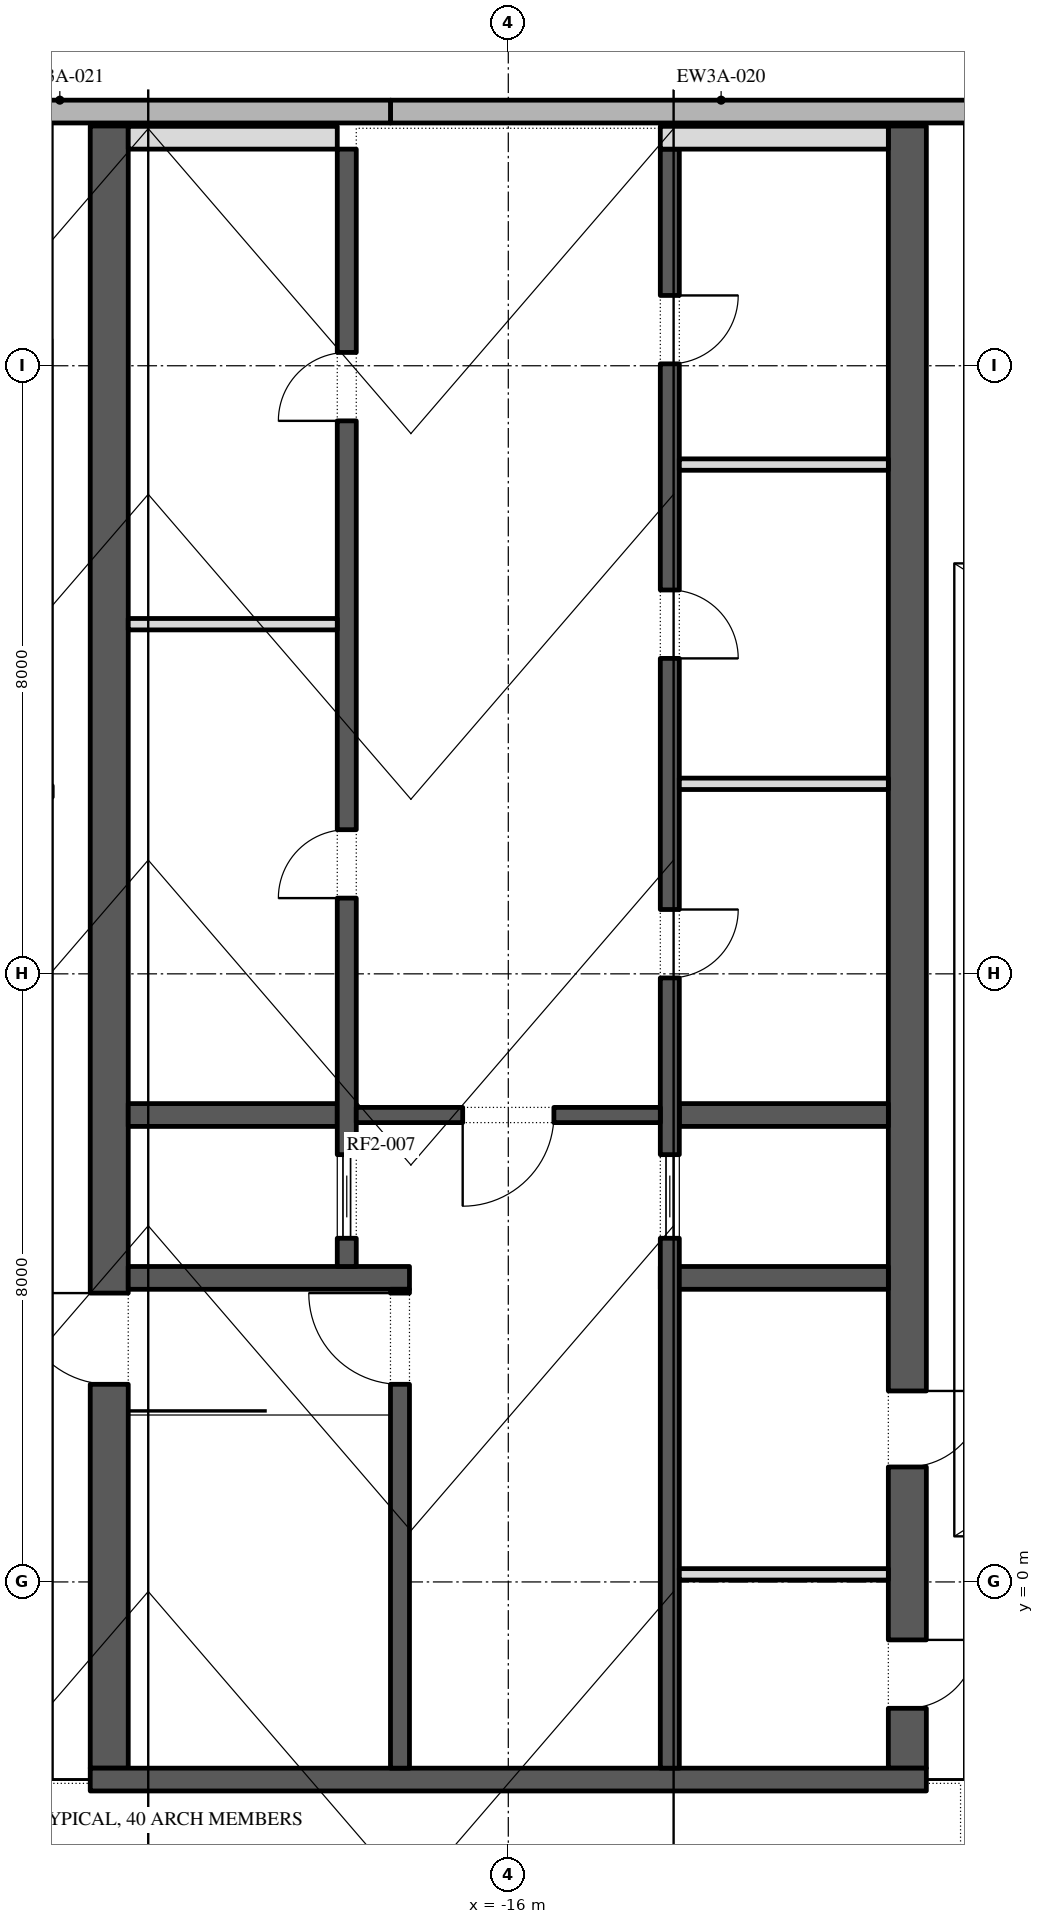
"""IFC4 building model, lengths in metres.
Left out: names, types, materials, properties, quantities, classifications, styles, units other than length and angle.
Written with IfcOpenShell. Run it as: python <this file> out.ifc"""

import sys

from ifc_helpers import new_model, si_unit, direction, frame, frame_2d, origin, place, context, subcontext, project, spatial, polyline, rectangle, outline, extrude, element, fill, save


model = new_model("IFC4")
c1 = context("Model", 3, precision=1e-05, world=origin(), true_north=direction((0.0, 1.0)))
c2 = subcontext(c1, "Body", "Model", "MODEL_VIEW")
j1 = project(units=[si_unit("LENGTHUNIT", "METRE"), si_unit("PLANEANGLEUNIT", "RADIAN")], contexts=[c1])
p1 = place(None, origin())
s1 = spatial("IfcSite", under=j1, at=p1, CompositionType="ELEMENT")
p2 = place(p1, origin())
s2 = spatial("IfcBuilding", under=s1, at=p2, CompositionType="ELEMENT")
p3 = place(p2, frame((0.0, 0.0, 394.2)))
s3 = spatial("IfcBuildingStorey", under=s2, at=p3, CompositionType="ELEMENT", Elevation=394.2)
for number, where, z_axis, x_axis in (
    (1, (-8.85, 19.344, 0.0), (0.0, 0.0, 1.0), (-1.0, 0.0, 0.0)),
    (2, (-17.55, 19.344, 0.0), (0.0, 0.0, 1.0), (-1.0, 0.0, 0.0)),
):
    element("IfcWall", number, at=place(p3, frame(where, z_axis=z_axis, x_axis=x_axis)), inside=s3, PredefinedType="STANDARD", context=c2, shape_type="SweptSolid", body=[
        extrude(rectangle(XDim=8.7, YDim=0.3, at=frame_2d((4.35, 0.0))), origin(), (0.0, 0.0, 1.0), 2.2),
    ])
p4 = place(p3, frame((-21.25, -2.45, 0.0), z_axis=(0.0, 0.0, 1.0), x_axis=(0.0, 1.0, 0.0)))
e3 = element("IfcWall", 3, at=p4, inside=s3, PredefinedType="SHEAR", context=c2, shape_type="SweptSolid", body=[
    extrude(outline(polyline([(0.0, 0.0), (21.604, 0.0), (21.604, 0.754), (16.939, 3.9), (0.0, 3.9), (0.0, 0.0)])), frame((0.0, 0.25, 0.0), z_axis=(0.0, -1.0, 0.0), x_axis=(1.0, 0.0, 0.0)), (0.0, 0.0, 1.0), 0.5),
])
p5 = place(p4, frame((5.05, 0.0, 0.0)))
e4 = element("IfcOpeningElement", 4, at=p5, cuts=e3, PredefinedType="OPENING", context=c2, shape_type="SweptSolid", body=[
    extrude(rectangle(XDim=1.2, YDim=2.1, at=frame_2d((0.6, 1.05))), frame((0.0, 0.26, 0.0), z_axis=(0.0, -1.0, 0.0), x_axis=(1.0, 0.0, 0.0)), (0.0, 0.0, 1.0), 0.52),
])
p6 = place(p3, frame((-10.75, -2.45, 0.0), z_axis=(0.0, 0.0, 1.0), x_axis=(0.0, 1.0, 0.0)))
e5 = element("IfcWall", 5, at=p6, inside=s3, PredefinedType="SHEAR", context=c2, shape_type="SweptSolid", body=[
    extrude(outline(polyline([(0.0, 0.0), (21.604, 0.0), (21.604, 0.754), (16.939, 3.9), (0.0, 3.9), (0.0, 0.0)])), frame((0.0, 0.25, 0.0), z_axis=(0.0, -1.0, 0.0), x_axis=(1.0, 0.0, 0.0)), (0.0, 0.0, 1.0), 0.5),
])
p7 = place(p6, frame((0.788, 0.0, 0.0)))
e6 = element("IfcOpeningElement", 6, at=p7, cuts=e5, PredefinedType="OPENING", context=c2, shape_type="SweptSolid", body=[
    extrude(rectangle(XDim=0.9, YDim=2.1, at=frame_2d((0.45, 1.05))), frame((0.0, 0.26, 0.0), z_axis=(0.0, -1.0, 0.0), x_axis=(1.0, 0.0, 0.0)), (0.0, 0.0, 1.0), 0.52),
])
p8 = place(p6, frame((3.962, 0.0, 0.0)))
e7 = element("IfcOpeningElement", 7, at=p8, cuts=e5, PredefinedType="OPENING", context=c2, shape_type="SweptSolid", body=[
    extrude(rectangle(XDim=1.0, YDim=2.1, at=frame_2d((0.5, 1.05))), frame((0.0, 0.26, 0.0), z_axis=(0.0, -1.0, 0.0), x_axis=(1.0, 0.0, 0.0)), (0.0, 0.0, 1.0), 0.52),
])
p9 = place(p3, frame((-21.5, -2.6, 0.0), z_axis=(0.0, 0.0, 1.0), x_axis=(1.0, 0.0, 0.0)))
e8 = element("IfcWall", 8, at=p9, inside=s3, PredefinedType="SHEAR", context=c2, shape_type="SweptSolid", body=[
    extrude(rectangle(XDim=11.0, YDim=0.3, at=frame_2d((5.5, 0.0))), origin(), (0.0, 0.0, 1.0), 3.9),
])
p10 = place(p3, frame((-21.0, 4.0, 0.0), z_axis=(0.0, 0.0, 1.0), x_axis=(1.0, 0.0, 0.0)))
e9 = element("IfcWall", 9, at=p10, inside=s3, PredefinedType="SHEAR", context=c2, shape_type="SweptSolid", body=[
    extrude(rectangle(XDim=3.7, YDim=0.3, at=frame_2d((1.85, 0.0))), origin(), (0.0, 0.0, 1.0), 3.9),
])
p11 = place(p3, frame((-17.425, -2.45, 0.0), z_axis=(0.0, 0.0, 1.0), x_axis=(0.0, 1.0, 0.0)))
e10 = element("IfcWall", 10, at=p11, inside=s3, PredefinedType="SHEAR", context=c2, shape_type="SweptSolid", body=[
    extrude(rectangle(XDim=6.3, YDim=0.25, at=frame_2d((3.15, 0.0))), origin(), (0.0, 0.0, 1.0), 3.9),
])
p12 = place(p11, frame((5.05, 0.0, 0.0)))
e11 = element("IfcOpeningElement", 11, at=p12, cuts=e10, PredefinedType="OPENING", context=c2, shape_type="SweptSolid", body=[
    extrude(rectangle(XDim=1.2, YDim=2.1, at=frame_2d((0.6, 1.05))), frame((0.0, 0.135, 0.0), z_axis=(0.0, -1.0, 0.0), x_axis=(1.0, 0.0, 0.0)), (0.0, 0.0, 1.0), 0.27),
])
p13 = place(p3, frame((-21.0, 6.143, 0.0), z_axis=(0.0, 0.0, 1.0), x_axis=(1.0, 0.0, 0.0)))
e12 = element("IfcWall", 12, at=p13, inside=s3, PredefinedType="SHEAR", context=c2, shape_type="SweptSolid", body=[
    extrude(rectangle(XDim=2.75, YDim=0.3, at=frame_2d((1.375, 0.0))), origin(), (0.0, 0.0, 1.0), 3.9),
])
p14 = place(p3, frame((-18.125, 4.15, 0.0), z_axis=(0.0, 0.0, 1.0), x_axis=(0.0, 1.0, 0.0)))
e13 = element("IfcWall", 13, at=p14, inside=s3, PredefinedType="SHEAR", context=c2, shape_type="SweptSolid", body=[
    extrude(outline(polyline([(0.0, 0.0), (14.7, 0.0), (14.7, 0.959), (10.339, 3.9), (0.0, 3.9), (0.0, 0.0)])), frame((0.0, 0.125, 0.0), z_axis=(0.0, -1.0, 0.0), x_axis=(1.0, 0.0, 0.0)), (0.0, 0.0, 1.0), 0.25),
])
p15 = place(p14, frame((4.846, 0.0, 0.0)))
e14 = element("IfcOpeningElement", 14, at=p15, cuts=e13, PredefinedType="OPENING", context=c2, shape_type="SweptSolid", body=[
    extrude(rectangle(XDim=0.9, YDim=2.1, at=frame_2d((0.45, 1.05))), frame((0.0, 0.135, 0.0), z_axis=(0.0, -1.0, 0.0), x_axis=(1.0, 0.0, 0.0)), (0.0, 0.0, 1.0), 0.27),
])
p16 = place(p14, frame((11.125, 0.0, 0.0)))
e15 = element("IfcOpeningElement", 15, at=p16, cuts=e13, PredefinedType="OPENING", context=c2, shape_type="SweptSolid", body=[
    extrude(rectangle(XDim=0.9, YDim=2.1, at=frame_2d((0.45, 1.05))), frame((0.0, 0.135, 0.0), z_axis=(0.0, -1.0, 0.0), x_axis=(1.0, 0.0, 0.0)), (0.0, 0.0, 1.0), 0.27),
])
p17 = place(p14, frame((0.371, 0.0, 0.0)))
e16 = element("IfcOpeningElement", 16, at=p17, cuts=e13, PredefinedType="OPENING", context=c2, shape_type="SweptSolid", body=[
    extrude(rectangle(XDim=1.1, YDim=2.1, at=frame_2d((0.55, 1.05))), frame((0.0, 0.135, 0.0), z_axis=(0.0, -1.0, 0.0), x_axis=(1.0, 0.0, 0.0)), (0.0, 0.0, 1.0), 0.27),
])
p18 = place(p3, frame((-21.0, 19.0, 0.0), z_axis=(0.0, 0.0, 1.0), x_axis=(1.0, 0.0, 0.0)))
e17 = element("IfcWall", 17, at=p18, inside=s3, PredefinedType="PARTITIONING", context=c2, shape_type="SweptSolid", body=[
    extrude(outline(polyline([(0.0, 0.0), (2.75, 0.0), (2.75, 0.858), (0.0, 0.858), (0.0, 0.0)])), frame((0.0, 0.15, 0.0), z_axis=(0.0, -1.0, 0.0), x_axis=(1.0, 0.0, 0.0)), (0.0, 0.0, 1.0), 0.3),
])
p19 = place(p3, frame((-21.0, 12.6, 0.0), z_axis=(0.0, 0.0, 1.0), x_axis=(1.0, 0.0, 0.0)))
e18 = element("IfcWall", 18, at=p19, inside=s3, PredefinedType="PARTITIONING", context=c2, shape_type="SweptSolid", body=[
    extrude(rectangle(XDim=2.75, YDim=0.15, at=frame_2d((1.375, 0.0))), origin(), (0.0, 0.0, 1.0), 3.9),
])
p20 = place(p3, frame((-14.0, 4.0, 0.0), z_axis=(0.0, 0.0, 1.0), x_axis=(1.0, 0.0, 0.0)))
e19 = element("IfcWall", 19, at=p20, inside=s3, PredefinedType="SHEAR", context=c2, shape_type="SweptSolid", body=[
    extrude(rectangle(XDim=3.0, YDim=0.3, at=frame_2d((1.5, 0.0))), origin(), (0.0, 0.0, 1.0), 3.9),
])
p21 = place(p3, frame((-13.75, 6.143, 0.0), z_axis=(0.0, 0.0, 1.0), x_axis=(1.0, 0.0, 0.0)))
e20 = element("IfcWall", 20, at=p21, inside=s3, PredefinedType="SHEAR", context=c2, shape_type="SweptSolid", body=[
    extrude(rectangle(XDim=2.75, YDim=0.3, at=frame_2d((1.375, 0.0))), origin(), (0.0, 0.0, 1.0), 3.9),
])
p22 = place(p3, frame((-13.875, -2.45, 0.0), z_axis=(0.0, 0.0, 1.0), x_axis=(0.0, 1.0, 0.0)))
e21 = element("IfcWall", 21, at=p22, inside=s3, PredefinedType="SHEAR", context=c2, shape_type="SweptSolid", body=[
    extrude(outline(polyline([(0.0, 0.0), (21.3, 0.0), (21.3, 0.959), (16.939, 3.9), (0.0, 3.9), (0.0, 0.0)])), frame((0.0, 0.125, 0.0), z_axis=(0.0, -1.0, 0.0), x_axis=(1.0, 0.0, 0.0)), (0.0, 0.0, 1.0), 0.25),
])
p23 = place(p22, frame((10.396, 0.0, 0.0)))
e22 = element("IfcOpeningElement", 22, at=p23, cuts=e21, PredefinedType="OPENING", context=c2, shape_type="SweptSolid", body=[
    extrude(rectangle(XDim=0.9, YDim=2.1, at=frame_2d((0.45, 1.05))), frame((0.0, 0.135, 0.0), z_axis=(0.0, -1.0, 0.0), x_axis=(1.0, 0.0, 0.0)), (0.0, 0.0, 1.0), 0.27),
])
p24 = place(p22, frame((14.6, 0.0, 0.0)))
e23 = element("IfcOpeningElement", 23, at=p24, cuts=e21, PredefinedType="OPENING", context=c2, shape_type="SweptSolid", body=[
    extrude(rectangle(XDim=0.9, YDim=2.1, at=frame_2d((0.45, 1.05))), frame((0.0, 0.135, 0.0), z_axis=(0.0, -1.0, 0.0), x_axis=(1.0, 0.0, 0.0)), (0.0, 0.0, 1.0), 0.27),
])
p25 = place(p22, frame((18.475, 0.0, 0.0)))
e24 = element("IfcOpeningElement", 24, at=p25, cuts=e21, PredefinedType="OPENING", context=c2, shape_type="SweptSolid", body=[
    extrude(rectangle(XDim=0.9, YDim=2.1, at=frame_2d((0.45, 1.05))), frame((0.0, 0.135, 0.0), z_axis=(0.0, -1.0, 0.0), x_axis=(1.0, 0.0, 0.0)), (0.0, 0.0, 1.0), 0.27),
])
p26 = place(p22, frame((6.971, 0.0, 0.0)))
e25 = element("IfcOpeningElement", 25, at=p26, cuts=e21, PredefinedType="OPENING", context=c2, shape_type="SweptSolid", body=[
    extrude(rectangle(XDim=1.1, YDim=2.1, at=frame_2d((0.55, 1.05))), frame((0.0, 0.135, 0.0), z_axis=(0.0, -1.0, 0.0), x_axis=(1.0, 0.0, 0.0)), (0.0, 0.0, 1.0), 0.27),
])
p27 = place(p3, frame((-14.0, 19.0, 0.0), z_axis=(0.0, 0.0, 1.0), x_axis=(1.0, 0.0, 0.0)))
e26 = element("IfcWall", 26, at=p27, inside=s3, PredefinedType="PARTITIONING", context=c2, shape_type="SweptSolid", body=[
    extrude(outline(polyline([(0.0, 0.0), (3.0, 0.0), (3.0, 0.858), (0.0, 0.858), (0.0, 0.0)])), frame((0.0, 0.15, 0.0), z_axis=(0.0, -1.0, 0.0), x_axis=(1.0, 0.0, 0.0)), (0.0, 0.0, 1.0), 0.3),
])
p28 = place(p3, frame((-13.75, 10.5, 0.0), z_axis=(0.0, 0.0, 1.0), x_axis=(1.0, 0.0, 0.0)))
e27 = element("IfcWall", 27, at=p28, inside=s3, PredefinedType="PARTITIONING", context=c2, shape_type="SweptSolid", body=[
    extrude(rectangle(XDim=2.75, YDim=0.15, at=frame_2d((1.375, 0.0))), origin(), (0.0, 0.0, 1.0), 3.9),
])
p29 = place(p3, frame((-13.75, 14.7, 0.0), z_axis=(0.0, 0.0, 1.0), x_axis=(1.0, 0.0, 0.0)))
e28 = element("IfcWall", 28, at=p29, inside=s3, PredefinedType="PARTITIONING", context=c2, shape_type="SweptSolid", body=[
    extrude(outline(polyline([(0.0, 0.0), (2.75, 0.0), (2.75, 3.758), (0.0, 3.758), (0.0, 0.0)])), frame((0.0, 0.075, 0.0), z_axis=(0.0, -1.0, 0.0), x_axis=(1.0, 0.0, 0.0)), (0.0, 0.0, 1.0), 0.15),
])
p30 = place(p3, frame((-18.0, 6.143, 0.0), z_axis=(0.0, 0.0, 1.0), x_axis=(1.0, 0.0, 0.0)))
e29 = element("IfcWall", 29, at=p30, inside=s3, PredefinedType="SHEAR", context=c2, shape_type="SweptSolid", body=[
    extrude(rectangle(XDim=4.0, YDim=0.2, at=frame_2d((2.0, 0.0))), origin(), (0.0, 0.0, 1.0), 3.9),
])
p31 = place(p30, frame((1.4, 0.0, 0.0)))
e30 = element("IfcOpeningElement", 30, at=p31, cuts=e29, PredefinedType="OPENING", context=c2, shape_type="SweptSolid", body=[
    extrude(rectangle(XDim=1.2, YDim=2.1, at=frame_2d((0.6, 1.05))), frame((0.0, 0.11, 0.0), z_axis=(0.0, -1.0, 0.0), x_axis=(1.0, 0.0, 0.0)), (0.0, 0.0, 1.0), 0.22),
])
p32 = place(p3, frame((-13.75, 0.1, 0.0), z_axis=(0.0, 0.0, 1.0), x_axis=(1.0, 0.0, 0.0)))
e31 = element("IfcWall", 31, at=p32, inside=s3, PredefinedType="PARTITIONING", context=c2, shape_type="SweptSolid", body=[
    extrude(rectangle(XDim=2.75, YDim=0.15, at=frame_2d((1.375, 0.0))), origin(), (0.0, 0.0, 1.0), 3.9),
])
p33 = place(p15, origin())
e32 = element("IfcDoor", 32, at=p33, inside=s3, OperationType="SINGLE_SWING_RIGHT", PredefinedType="DOOR", context=c2, shape_type="SweptSolid", body=[
    extrude(rectangle(XDim=0.9, YDim=2.1, at=frame_2d((0.45, 1.05))), frame((0.0, 0.125, 0.0), z_axis=(0.0, -1.0, 0.0), x_axis=(1.0, 0.0, 0.0)), (0.0, 0.0, 1.0), 0.05),
])
fill(e14, e32)
p34 = place(p16, origin())
e33 = element("IfcDoor", 33, at=p34, inside=s3, OperationType="SINGLE_SWING_RIGHT", PredefinedType="DOOR", context=c2, shape_type="SweptSolid", body=[
    extrude(rectangle(XDim=0.9, YDim=2.1, at=frame_2d((0.45, 1.05))), frame((0.0, 0.125, 0.0), z_axis=(0.0, -1.0, 0.0), x_axis=(1.0, 0.0, 0.0)), (0.0, 0.0, 1.0), 0.05),
])
fill(e15, e33)
p35 = place(p17, origin())
e34 = element("IfcDoor", 34, at=p35, inside=s3, OperationType="SLIDING_TO_LEFT", PredefinedType="DOOR", context=c2, shape_type="SweptSolid", body=[
    extrude(rectangle(XDim=1.1, YDim=2.1, at=frame_2d((0.55, 1.05))), frame((0.0, 0.025, 0.0), z_axis=(0.0, -1.0, 0.0), x_axis=(1.0, 0.0, 0.0)), (0.0, 0.0, 1.0), 0.05),
])
fill(e16, e34)
p36 = place(p23, frame((0.9, -0.2, 0.0), z_axis=(0.0, 0.0, 1.0), x_axis=(-1.0, 0.0, 0.0)))
e35 = element("IfcDoor", 35, at=p36, inside=s3, OperationType="SINGLE_SWING_RIGHT", PredefinedType="DOOR", context=c2, shape_type="SweptSolid", body=[
    extrude(rectangle(XDim=0.9, YDim=2.1, at=frame_2d((0.45, 1.05))), frame((0.0, -0.075, 0.0), z_axis=(0.0, -1.0, 0.0), x_axis=(1.0, 0.0, 0.0)), (0.0, 0.0, 1.0), 0.05),
])
fill(e22, e35)
p37 = place(p24, frame((0.9, -0.2, 0.0), z_axis=(0.0, 0.0, 1.0), x_axis=(-1.0, 0.0, 0.0)))
e36 = element("IfcDoor", 36, at=p37, inside=s3, OperationType="SINGLE_SWING_LEFT", PredefinedType="DOOR", context=c2, shape_type="SweptSolid", body=[
    extrude(rectangle(XDim=0.9, YDim=2.1, at=frame_2d((0.45, 1.05))), frame((0.0, -0.075, 0.0), z_axis=(0.0, -1.0, 0.0), x_axis=(1.0, 0.0, 0.0)), (0.0, 0.0, 1.0), 0.05),
])
fill(e23, e36)
p38 = place(p25, frame((0.9, -0.2, 0.0), z_axis=(0.0, 0.0, 1.0), x_axis=(-1.0, 0.0, 0.0)))
e37 = element("IfcDoor", 37, at=p38, inside=s3, OperationType="SINGLE_SWING_RIGHT", PredefinedType="DOOR", context=c2, shape_type="SweptSolid", body=[
    extrude(rectangle(XDim=0.9, YDim=2.1, at=frame_2d((0.45, 1.05))), frame((0.0, -0.075, 0.0), z_axis=(0.0, -1.0, 0.0), x_axis=(1.0, 0.0, 0.0)), (0.0, 0.0, 1.0), 0.05),
])
fill(e24, e37)
p39 = place(p26, origin())
e38 = element("IfcDoor", 38, at=p39, inside=s3, OperationType="SLIDING_TO_LEFT", PredefinedType="DOOR", context=c2, shape_type="SweptSolid", body=[
    extrude(rectangle(XDim=1.1, YDim=2.1, at=frame_2d((0.55, 1.05))), frame((0.0, 0.025, 0.0), z_axis=(0.0, -1.0, 0.0), x_axis=(1.0, 0.0, 0.0)), (0.0, 0.0, 1.0), 0.05),
])
fill(e25, e38)
p40 = place(p31, frame((1.2, 0.0, 0.0), z_axis=(0.0, 0.0, 1.0), x_axis=(-1.0, 0.0, 0.0)))
e39 = element("IfcDoor", 39, at=p40, inside=s3, OperationType="SINGLE_SWING_LEFT", PredefinedType="DOOR", context=c2, shape_type="SweptSolid", body=[
    extrude(rectangle(XDim=1.2, YDim=2.1, at=frame_2d((0.6, 1.05))), frame((0.0, 0.025, 0.0), z_axis=(0.0, -1.0, 0.0), x_axis=(1.0, 0.0, 0.0)), (0.0, 0.0, 1.0), 0.05),
])
fill(e30, e39)
p41 = place(p12, origin())
e40 = element("IfcDoor", 40, at=p41, inside=s3, OperationType="SINGLE_SWING_LEFT", PredefinedType="DOOR", context=c2, shape_type="SweptSolid", body=[
    extrude(rectangle(XDim=1.2, YDim=2.1, at=frame_2d((0.6, 1.05))), frame((0.0, 0.025, 0.0), z_axis=(0.0, -1.0, 0.0), x_axis=(1.0, 0.0, 0.0)), (0.0, 0.0, 1.0), 0.05),
])
fill(e11, e40)
p42 = place(p5, origin())
e41 = element("IfcDoor", 41, at=p42, inside=s3, OperationType="SINGLE_SWING_LEFT", PredefinedType="DOOR", context=c2, shape_type="SweptSolid", body=[
    extrude(rectangle(XDim=1.2, YDim=2.1, at=frame_2d((0.6, 1.05))), frame((0.0, 0.025, 0.0), z_axis=(0.0, -1.0, 0.0), x_axis=(1.0, 0.0, 0.0)), (0.0, 0.0, 1.0), 0.05),
])
fill(e4, e41)
p43 = place(p7, frame((0.9, 0.45, 0.0), z_axis=(0.0, 0.0, 1.0), x_axis=(-1.0, 0.0, 0.0)))
e42 = element("IfcDoor", 42, at=p43, inside=s3, OperationType="SINGLE_SWING_RIGHT", PredefinedType="DOOR", context=c2, shape_type="SweptSolid", body=[
    extrude(rectangle(XDim=0.9, YDim=2.1, at=frame_2d((0.45, 1.05))), frame((0.0, 0.25, 0.0), z_axis=(0.0, -1.0, 0.0), x_axis=(1.0, 0.0, 0.0)), (0.0, 0.0, 1.0), 0.05),
])
fill(e6, e42)
p44 = place(p8, frame((1.0, 0.45, 0.0), z_axis=(0.0, 0.0, 1.0), x_axis=(-1.0, 0.0, 0.0)))
e43 = element("IfcDoor", 43, at=p44, inside=s3, OperationType="SINGLE_SWING_RIGHT", PredefinedType="DOOR", context=c2, shape_type="SweptSolid", body=[
    extrude(rectangle(XDim=1.0, YDim=2.1, at=frame_2d((0.5, 1.05))), frame((0.0, 0.25, 0.0), z_axis=(0.0, -1.0, 0.0), x_axis=(1.0, 0.0, 0.0)), (0.0, 0.0, 1.0), 0.05),
])
fill(e7, e43)
save(model, sys.argv[1])
